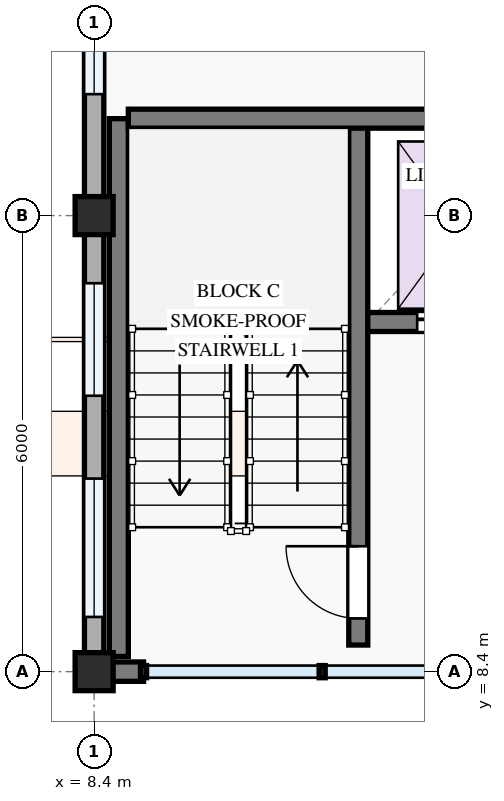
"""IFC4 building model, lengths in metres.
Left out: names, types, materials, properties, quantities, classifications, styles, units other than length and angle.
Written with IfcOpenShell. Run it as: python <this file> out.ifc"""

import sys

from ifc_helpers import new_model, si_unit, direction, frame, frame_2d, origin, origin_2d, place, context, subcontext, project, spatial, rectangle, extrude, element, fill, save


model = new_model("IFC4")
c1 = context("Model", 3, precision=1e-05, world=origin(), true_north=direction((0.0, 1.0)))
c2 = subcontext(c1, "Body", "Model", "MODEL_VIEW")
j1 = project(units=[si_unit("LENGTHUNIT", "METRE"), si_unit("PLANEANGLEUNIT", "RADIAN")], contexts=[c1])
p1 = place(None, origin())
s1 = spatial("IfcSite", under=j1, at=p1, CompositionType="ELEMENT")
p2 = place(p1, origin())
s2 = spatial("IfcBuilding", under=s1, at=p2, CompositionType="ELEMENT")
p3 = place(p2, frame((0.0, 0.0, 31.2)))
s3 = spatial("IfcBuildingStorey", under=s2, at=p3, CompositionType="ELEMENT", Elevation=31.2)
for number, where, z_axis, x_axis in (
    (1, (8.4, 8.4, 0.0), (0.0, 0.0, 1.0), (1.0, 0.0, 0.0)),
    (2, (8.4, 14.4, 0.0), (0.0, 0.0, 1.0), (1.0, 0.0, 0.0)),
):
    element("IfcColumn", number, at=place(p3, frame(where, z_axis=z_axis, x_axis=x_axis)), inside=s3, PredefinedType="COLUMN", context=c2, shape_type="SweptSolid", body=[
        extrude(rectangle(XDim=0.5, YDim=0.5, at=origin_2d()), origin(), (0.0, 0.0, 1.0), 3.3),
    ])
p4 = place(p3, frame((8.4, 22.8, 0.0), z_axis=(0.0, 0.0, 1.0), x_axis=(0.0, -1.0, 0.0)))
e3 = element("IfcWall", 3, at=p4, inside=s3, PredefinedType="STANDARD", context=c2, shape_type="SweptSolid", body=[
    extrude(rectangle(XDim=8.4, YDim=0.255, at=frame_2d((4.2, 0.0))), origin(), (0.0, 0.0, 1.0), 2.425),
])
p5 = place(p4, frame((1.055, 0.0, 0.78)))
e4 = element("IfcOpeningElement", 4, at=p5, cuts=e3, PredefinedType="OPENING", context=c2, shape_type="SweptSolid", body=[
    extrude(rectangle(XDim=2.28, YDim=1.46, at=frame_2d((1.14, 0.73))), frame((0.0, 0.137, 0.0), z_axis=(0.0, -1.0, 0.0), x_axis=(1.0, 0.0, 0.0)), (0.0, 0.0, 1.0), 0.275),
])
p6 = place(p4, frame((4.522, 0.0, 0.78)))
e5 = element("IfcOpeningElement", 5, at=p6, cuts=e3, PredefinedType="OPENING", context=c2, shape_type="SweptSolid", body=[
    extrude(rectangle(XDim=2.28, YDim=1.46, at=frame_2d((1.14, 0.73))), frame((0.0, 0.137, 0.0), z_axis=(0.0, -1.0, 0.0), x_axis=(1.0, 0.0, 0.0)), (0.0, 0.0, 1.0), 0.275),
])
p7 = place(p3, frame((8.4, 14.4, 0.0), z_axis=(0.0, 0.0, 1.0), x_axis=(0.0, -1.0, 0.0)))
e6 = element("IfcWall", 6, at=p7, inside=s3, PredefinedType="STANDARD", context=c2, shape_type="SweptSolid", body=[
    extrude(rectangle(XDim=6.0, YDim=0.255, at=frame_2d((3.0, 0.0))), origin(), (0.0, 0.0, 1.0), 2.575),
])
p8 = place(p7, frame((0.89, 0.0, 0.78)))
e7 = element("IfcOpeningElement", 7, at=p8, cuts=e6, PredefinedType="OPENING", context=c2, shape_type="SweptSolid", body=[
    extrude(rectangle(XDim=1.48, YDim=1.52, at=frame_2d((0.74, 0.76))), frame((0.0, 0.137, 0.0), z_axis=(0.0, -1.0, 0.0), x_axis=(1.0, 0.0, 0.0)), (0.0, 0.0, 1.0), 0.275),
])
p9 = place(p7, frame((3.46, 0.0, 0.78)))
e8 = element("IfcOpeningElement", 8, at=p9, cuts=e6, PredefinedType="OPENING", context=c2, shape_type="SweptSolid", body=[
    extrude(rectangle(XDim=1.82, YDim=1.46, at=frame_2d((0.91, 0.73))), frame((0.0, 0.137, 0.0), z_axis=(0.0, -1.0, 0.0), x_axis=(1.0, 0.0, 0.0)), (0.0, 0.0, 1.0), 0.275),
])
p10 = place(p3, frame((8.53, 8.4, 0.0), z_axis=(0.0, 0.0, 1.0), x_axis=(1.0, 0.0, 0.0)))
e9 = element("IfcWall", 9, at=p10, inside=s3, PredefinedType="STANDARD", context=c2, shape_type="SweptSolid", body=[
    extrude(rectangle(XDim=0.521, YDim=0.255, at=frame_2d((0.26, 0.0))), origin(), (0.0, 0.0, 1.0), 3.04),
])
p11 = place(p3, frame((11.875, 8.75, 0.0), z_axis=(0.0, 0.0, 1.0), x_axis=(0.0, 1.0, 0.0)))
e10 = element("IfcWall", 10, at=p11, inside=s3, PredefinedType="SHEAR", context=c2, shape_type="SweptSolid", body=[
    extrude(rectangle(XDim=6.925, YDim=0.25, at=frame_2d((3.462, 0.0))), origin(), (0.0, 0.0, 1.0), 3.0),
])
p12 = place(p11, frame((0.35, 0.0, 0.0)))
e11 = element("IfcOpeningElement", 11, at=p12, cuts=e10, PredefinedType="OPENING", context=c2, shape_type="SweptSolid", body=[
    extrude(rectangle(XDim=0.95, YDim=2.1, at=frame_2d((0.475, 1.05))), frame((0.0, 0.135, 0.0), z_axis=(0.0, -1.0, 0.0), x_axis=(1.0, 0.0, 0.0)), (0.0, 0.0, 1.0), 0.27),
])
p13 = place(p3, frame((8.725, 8.6, 0.0), z_axis=(0.0, 0.0, 1.0), x_axis=(0.0, 1.0, 0.0)))
e12 = element("IfcWall", 12, at=p13, inside=s3, PredefinedType="SHEAR", context=c2, shape_type="SweptSolid", body=[
    extrude(rectangle(XDim=7.075, YDim=0.25, at=frame_2d((3.538, 0.0))), origin(), (0.0, 0.0, 1.0), 3.0),
])
p14 = place(p3, frame((12.0, 13.0, 0.0), z_axis=(0.0, 0.0, 1.0), x_axis=(1.0, 0.0, 0.0)))
e13 = element("IfcWall", 13, at=p14, inside=s3, PredefinedType="SHEAR", context=c2, shape_type="SweptSolid", body=[
    extrude(rectangle(XDim=2.425, YDim=0.25, at=frame_2d((1.212, 0.0))), origin(), (0.0, 0.0, 1.0), 3.0),
])
p15 = place(p14, frame((0.65, 0.0, 0.0)))
e14 = element("IfcOpeningElement", 14, at=p15, cuts=e13, PredefinedType="OPENING", context=c2, shape_type="SweptSolid", body=[
    extrude(rectangle(XDim=1.1, YDim=2.15, at=frame_2d((0.55, 1.075))), frame((0.0, 0.135, 0.0), z_axis=(0.0, -1.0, 0.0), x_axis=(1.0, 0.0, 0.0)), (0.0, 0.0, 1.0), 0.27),
])
p16 = place(p3, frame((8.85, 15.675, 0.0), z_axis=(0.0, 0.0, 1.0), x_axis=(1.0, 0.0, 0.0)))
e15 = element("IfcWall", 15, at=p16, inside=s3, PredefinedType="SHEAR", context=c2, shape_type="SweptSolid", body=[
    extrude(rectangle(XDim=13.5, YDim=0.25, at=frame_2d((6.75, 0.0))), origin(), (0.0, 0.0, 1.0), 3.0),
])
p17 = place(p16, frame((6.2, 0.0, 0.0)))
e16 = element("IfcOpeningElement", 16, at=p17, cuts=e15, PredefinedType="OPENING", context=c2, shape_type="SweptSolid", body=[
    extrude(rectangle(XDim=1.1, YDim=2.15, at=frame_2d((0.55, 1.075))), frame((0.0, 0.135, 0.0), z_axis=(0.0, -1.0, 0.0), x_axis=(1.0, 0.0, 0.0)), (0.0, 0.0, 1.0), 0.27),
])
p18 = place(p6, origin())
e17 = element("IfcWindow", 17, at=p18, inside=s3, PartitioningType="DOUBLE_PANEL_VERTICAL", PredefinedType="WINDOW", context=c2, shape_type="SweptSolid", body=[
    extrude(rectangle(XDim=2.28, YDim=1.46, at=frame_2d((1.14, 0.73))), frame((0.0, 0.03, 0.0), z_axis=(0.0, -1.0, 0.0), x_axis=(1.0, 0.0, 0.0)), (0.0, 0.0, 1.0), 0.06),
])
fill(e5, e17)
p19 = place(p8, origin())
e18 = element("IfcWindow", 18, at=p19, inside=s3, PartitioningType="SINGLE_PANEL", PredefinedType="WINDOW", context=c2, shape_type="SweptSolid", body=[
    extrude(rectangle(XDim=1.48, YDim=1.52, at=frame_2d((0.74, 0.76))), frame((0.0, 0.03, 0.0), z_axis=(0.0, -1.0, 0.0), x_axis=(1.0, 0.0, 0.0)), (0.0, 0.0, 1.0), 0.06),
])
fill(e7, e18)
p20 = place(p9, origin())
e19 = element("IfcWindow", 19, at=p20, inside=s3, PartitioningType="DOUBLE_PANEL_VERTICAL", PredefinedType="WINDOW", context=c2, shape_type="SweptSolid", body=[
    extrude(rectangle(XDim=1.82, YDim=1.46, at=frame_2d((0.91, 0.73))), frame((0.0, 0.03, 0.0), z_axis=(0.0, -1.0, 0.0), x_axis=(1.0, 0.0, 0.0)), (0.0, 0.0, 1.0), 0.06),
])
fill(e8, e19)
p21 = place(p12, origin())
e20 = element("IfcDoor", 20, at=p21, inside=s3, OperationType="SINGLE_SWING_RIGHT", PredefinedType="DOOR", context=c2, shape_type="SweptSolid", body=[
    extrude(rectangle(XDim=0.95, YDim=2.1, at=frame_2d((0.475, 1.05))), frame((0.0, 0.025, 0.0), z_axis=(0.0, -1.0, 0.0), x_axis=(1.0, 0.0, 0.0)), (0.0, 0.0, 1.0), 0.05),
])
fill(e11, e20)
p22 = place(p15, origin())
e21 = element("IfcDoor", 21, at=p22, inside=s3, OperationType="SLIDING_TO_LEFT", PredefinedType="DOOR", context=c2, shape_type="SweptSolid", body=[
    extrude(rectangle(XDim=1.1, YDim=2.15, at=frame_2d((0.55, 1.075))), frame((0.0, 0.025, 0.0), z_axis=(0.0, -1.0, 0.0), x_axis=(1.0, 0.0, 0.0)), (0.0, 0.0, 1.0), 0.05),
])
fill(e14, e21)
save(model, sys.argv[1])
